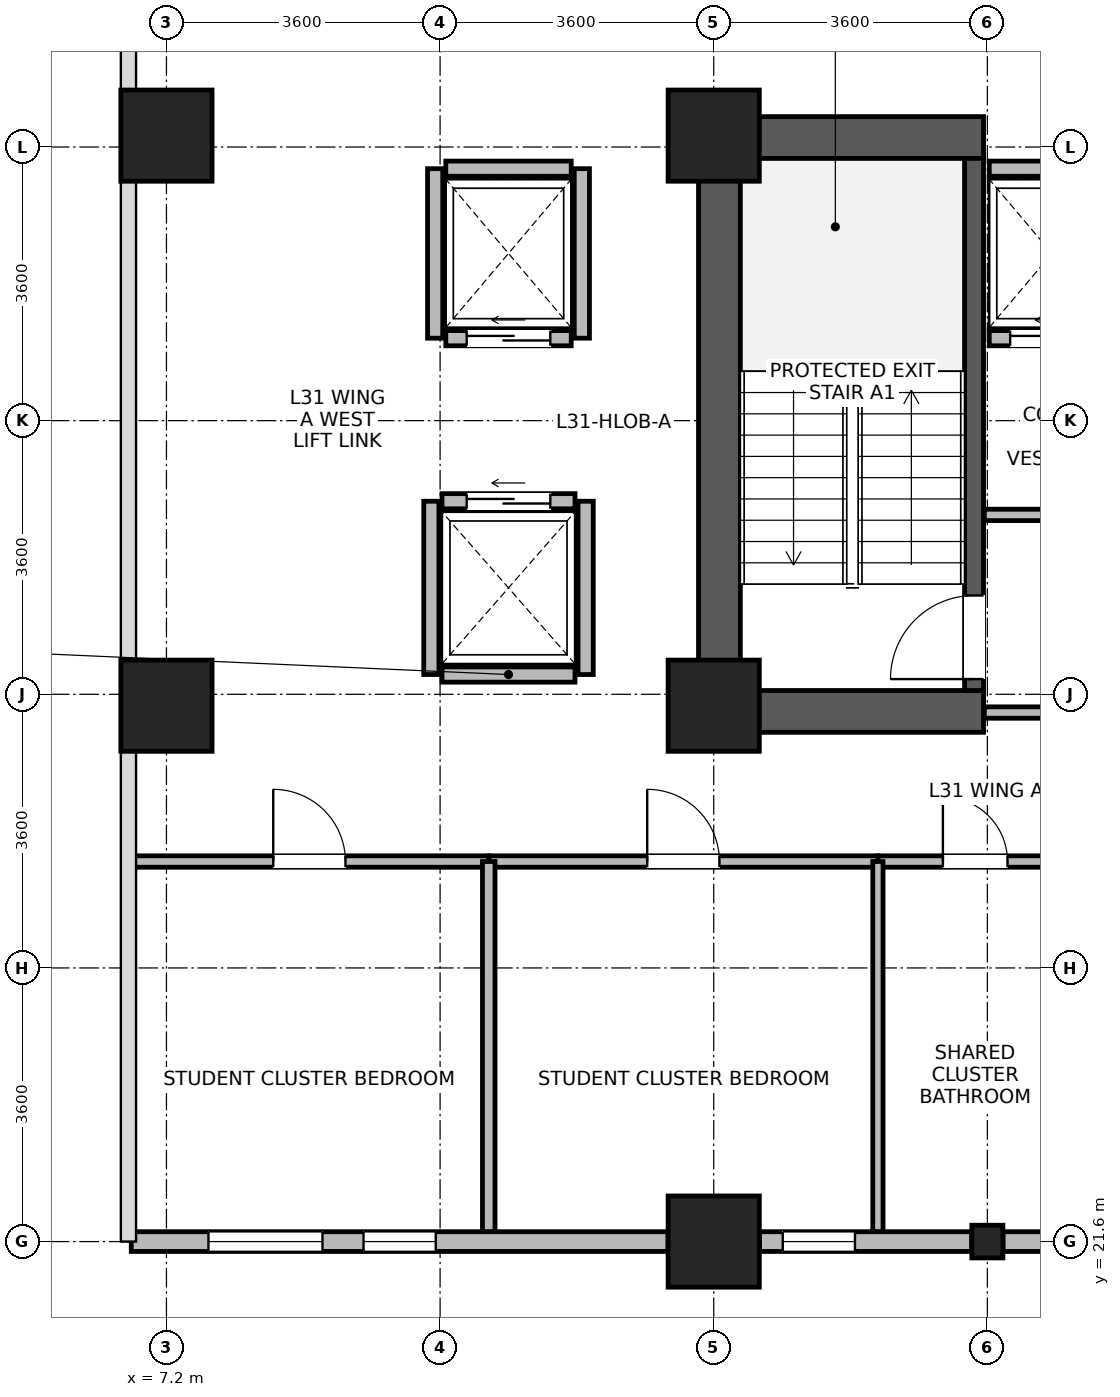
"""IFC4 building model, lengths in metres.
Left out: names, types, materials, properties, quantities, classifications, styles, units other than length and angle.
Written with IfcOpenShell. Run it as: python <this file> out.ifc"""

import sys

from ifc_helpers import new_model, si_unit, direction, frame, frame_2d, origin, origin_2d, place, context, subcontext, project, spatial, rectangle, i_section, extrude, source, transform, mapped, element, fill, save


model = new_model("IFC4")
c1 = context("Model", 3, precision=1e-05, world=origin(), true_north=direction((0.0, 1.0)))
c2 = subcontext(c1, "Body", "Model", "MODEL_VIEW")
j1 = project(units=[si_unit("LENGTHUNIT", "METRE"), si_unit("PLANEANGLEUNIT", "RADIAN")], contexts=[c1])
p1 = place(None, origin())
s1 = spatial("IfcSite", under=j1, at=p1, CompositionType="ELEMENT")
p2 = place(p1, origin())
s2 = spatial("IfcBuilding", under=s1, at=p2, CompositionType="ELEMENT")
p3 = place(p2, frame((0.0, 0.0, 123.0)))
s3 = spatial("IfcBuildingStorey", under=s2, at=p3, CompositionType="ELEMENT", Elevation=123.0)
p4 = place(p3, frame((14.475, 28.3, 0.0), z_axis=(0.0, 0.0, 1.0), x_axis=(0.0, 1.0, 0.0)))
e1 = element("IfcWall", 1, at=p4, inside=s3, PredefinedType="SHEAR", context=c2, shape_type="SweptSolid", body=[
    extrude(rectangle(XDim=8.1, YDim=0.55, at=frame_2d((4.05, 0.0))), origin(), (0.0, 0.0, 1.0), 3.45),
])
for number, where, z_axis, x_axis in (
    (2, (14.75, 28.575, 0.0), (0.0, 0.0, 1.0), (1.0, 0.0, 0.0)),
    (3, (14.75, 36.125, 0.0), (0.0, 0.0, 1.0), (1.0, 0.0, 0.0)),
):
    element("IfcWall", number, at=place(p3, frame(where, z_axis=z_axis, x_axis=x_axis)), inside=s3, PredefinedType="SHEAR", context=c2, shape_type="SweptSolid", body=[
        extrude(rectangle(XDim=3.2, YDim=0.55, at=frame_2d((1.6, 0.0))), origin(), (0.0, 0.0, 1.0), 3.45),
    ])
p5 = place(p3, frame((17.825, 28.85, 0.0), z_axis=(0.0, 0.0, 1.0), x_axis=(0.0, 1.0, 0.0)))
e4 = element("IfcWall", 4, at=p5, inside=s3, PredefinedType="SHEAR", context=c2, shape_type="SweptSolid", body=[
    extrude(rectangle(XDim=7.0, YDim=0.25, at=frame_2d((3.5, 0.0))), origin(), (0.0, 0.0, 1.0), 3.45),
])
p6 = place(p5, frame((0.15, 0.0, 0.0)))
e5 = element("IfcOpeningElement", 5, at=p6, cuts=e4, PredefinedType="OPENING", context=c2, shape_type="SweptSolid", body=[
    extrude(rectangle(XDim=1.1, YDim=2.08, at=frame_2d((0.55, 1.04))), frame((0.0, 0.135, 0.0), z_axis=(0.0, -1.0, 0.0), x_axis=(1.0, 0.0, 0.0)), (0.0, 0.0, 1.0), 0.27),
])
m1 = source(origin(), c2, "Body", "SweptSolid", [
    extrude(rectangle(XDim=1.2, YDim=1.2, at=origin_2d()), origin(), (0.0, 0.0, 1.0), 3.7),
])
for number, where, z_axis, x_axis in (
    (6, (7.2, 28.65, 0.0), (0.0, 0.0, 1.0), (1.0, 0.0, 0.0)),
    (7, (7.2, 36.15, 0.0), (0.0, 0.0, 1.0), (1.0, 0.0, 0.0)),
    (8, (14.4, 21.6, 0.0), (0.0, 0.0, 1.0), (1.0, 0.0, 0.0)),
    (9, (14.4, 28.65, 0.0), (0.0, 0.0, 1.0), (1.0, 0.0, 0.0)),
    (10, (14.4, 36.15, 0.0), (0.0, 0.0, 1.0), (1.0, 0.0, 0.0)),
):
    element("IfcColumn", number, at=place(p3, frame(where, z_axis=z_axis, x_axis=x_axis)), inside=s3, PredefinedType="COLUMN", context=c2, shape_type="MappedRepresentation", body=[
        mapped(m1, transform((0.0, 0.0, 0.0), x_axis=(1.0, 0.0, 0.0), y_axis=(0.0, 1.0, 0.0), z_axis=(0.0, 0.0, 1.0), scale=1.0)),
    ])
m2 = source(origin(), c2, "Body", "SweptSolid", [
    extrude(i_section(OverallWidth=0.409, OverallDepth=0.43, WebThickness=0.024, FlangeThickness=0.033, FilletRadius=0.015, at=origin_2d()), origin(), (0.0, 0.0, 1.0), 3.7),
])
p7 = place(p3, frame((18.0, 21.6, 0.0), z_axis=(0.0, 0.0, 1.0), x_axis=(1.0, 0.0, 0.0)))
e11 = element("IfcColumn", 11, at=p7, inside=s3, PredefinedType="COLUMN", context=c2, shape_type="MappedRepresentation", body=[
    mapped(m2, transform((0.0, 0.0, 0.0), x_axis=(1.0, 0.0, 0.0), y_axis=(0.0, 1.0, 0.0), z_axis=(0.0, 0.0, 1.0), scale=1.0)),
])
p8 = place(p3, frame((13.799, 21.6, 0.0), z_axis=(0.0, 0.0, 1.0), x_axis=(-1.0, 0.0, 0.0)))
e12 = element("IfcWall", 12, at=p8, inside=s3, PredefinedType="STANDARD", context=c2, shape_type="SweptSolid", body=[
    extrude(rectangle(XDim=7.062, YDim=0.26, at=frame_2d((3.531, 0.0))), origin(), (0.0, 0.0, 1.0), 3.43),
])
p9 = place(p8, frame((4.546, 0.0, 0.85)))
e13 = element("IfcOpeningElement", 13, at=p9, cuts=e12, PredefinedType="OPENING", context=c2, shape_type="SweptSolid", body=[
    extrude(rectangle(XDim=1.5, YDim=1.85, at=frame_2d((0.75, 0.925))), frame((0.0, 0.14, 0.0), z_axis=(0.0, -1.0, 0.0), x_axis=(1.0, 0.0, 0.0)), (0.0, 0.0, 1.0), 0.28),
])
p10 = place(p8, frame((3.056, 0.0, 0.85)))
e14 = element("IfcOpeningElement", 14, at=p10, cuts=e12, PredefinedType="OPENING", context=c2, shape_type="SweptSolid", body=[
    extrude(rectangle(XDim=0.95, YDim=1.75, at=frame_2d((0.475, 0.875))), frame((0.0, 0.14, 0.0), z_axis=(0.0, -1.0, 0.0), x_axis=(1.0, 0.0, 0.0)), (0.0, 0.0, 1.0), 0.28),
])
p11 = place(p3, frame((17.794, 21.6, 0.0), z_axis=(0.0, 0.0, 1.0), x_axis=(-1.0, 0.0, 0.0)))
e15 = element("IfcWall", 15, at=p11, inside=s3, PredefinedType="STANDARD", context=c2, shape_type="SweptSolid", body=[
    extrude(rectangle(XDim=2.793, YDim=0.26, at=frame_2d((1.397, 0.0))), origin(), (0.0, 0.0, 1.0), 2.98),
])
p12 = place(p11, frame((1.536, 0.0, 0.85)))
e16 = element("IfcOpeningElement", 16, at=p12, cuts=e15, PredefinedType="OPENING", context=c2, shape_type="SweptSolid", body=[
    extrude(rectangle(XDim=0.95, YDim=1.75, at=frame_2d((0.475, 0.875))), frame((0.0, 0.14, 0.0), z_axis=(0.0, -1.0, 0.0), x_axis=(1.0, 0.0, 0.0)), (0.0, 0.0, 1.0), 0.28),
])
p13 = place(p3, frame((20.999, 21.6, 0.0), z_axis=(0.0, 0.0, 1.0), x_axis=(-1.0, 0.0, 0.0)))
e17 = element("IfcWall", 17, at=p13, inside=s3, PredefinedType="STANDARD", context=c2, shape_type="SweptSolid", body=[
    extrude(rectangle(XDim=2.793, YDim=0.26, at=frame_2d((1.397, 0.0))), origin(), (0.0, 0.0, 1.0), 2.98),
])
p14 = place(p13, frame((0.307, 0.0, 0.85)))
e18 = element("IfcOpeningElement", 18, at=p14, cuts=e17, PredefinedType="OPENING", context=c2, shape_type="SweptSolid", body=[
    extrude(rectangle(XDim=0.95, YDim=1.75, at=frame_2d((0.475, 0.875))), frame((0.0, 0.14, 0.0), z_axis=(0.0, -1.0, 0.0), x_axis=(1.0, 0.0, 0.0)), (0.0, 0.0, 1.0), 0.28),
])
p15 = place(p3, frame((18.025, 33.485, 0.0), z_axis=(0.0, 0.0, 1.0), x_axis=(1.0, 0.0, 0.0)))
e19 = element("IfcWall", 19, at=p15, inside=s3, PredefinedType="PARTITIONING", context=c2, shape_type="SweptSolid", body=[
    extrude(rectangle(XDim=1.65, YDim=0.2, at=frame_2d((0.825, 0.0))), origin(), (0.0, 0.0, 1.0), 3.43),
])
p16 = place(p15, frame((0.275, 0.0, 0.0)))
e20 = element("IfcOpeningElement", 20, at=p16, cuts=e19, PredefinedType="OPENING", context=c2, shape_type="SweptSolid", body=[
    extrude(rectangle(XDim=1.1, YDim=2.12, at=frame_2d((0.55, 1.06))), frame((0.0, 0.11, 0.0), z_axis=(0.0, -1.0, 0.0), x_axis=(1.0, 0.0, 0.0)), (0.0, 0.0, 1.0), 0.22),
])
p17 = place(p3, frame((18.025, 35.715, 0.0), z_axis=(0.0, 0.0, 1.0), x_axis=(1.0, 0.0, 0.0)))
e21 = element("IfcWall", 21, at=p17, inside=s3, PredefinedType="PARTITIONING", context=c2, shape_type="SweptSolid", body=[
    extrude(rectangle(XDim=1.65, YDim=0.2, at=frame_2d((0.825, 0.0))), origin(), (0.0, 0.0, 1.0), 3.43),
])
p18 = place(p3, frame((10.825, 29.06, 0.0), z_axis=(0.0, 0.0, 1.0), x_axis=(1.0, 0.0, 0.0)))
e22 = element("IfcWall", 22, at=p18, inside=s3, PredefinedType="PARTITIONING", context=c2, shape_type="SweptSolid", body=[
    extrude(rectangle(XDim=1.75, YDim=0.2, at=frame_2d((0.875, 0.0))), origin(), (0.0, 0.0, 1.0), 3.43),
])
p19 = place(p3, frame((10.825, 31.34, 0.0), z_axis=(0.0, 0.0, 1.0), x_axis=(1.0, 0.0, 0.0)))
e23 = element("IfcWall", 23, at=p19, inside=s3, PredefinedType="PARTITIONING", context=c2, shape_type="SweptSolid", body=[
    extrude(rectangle(XDim=1.75, YDim=0.2, at=frame_2d((0.875, 0.0))), origin(), (0.0, 0.0, 1.0), 3.43),
])
p20 = place(p19, frame((0.325, 0.0, 0.0)))
e24 = element("IfcOpeningElement", 24, at=p20, cuts=e23, PredefinedType="OPENING", context=c2, shape_type="SweptSolid", body=[
    extrude(rectangle(XDim=1.1, YDim=2.12, at=frame_2d((0.55, 1.06))), frame((0.0, 0.11, 0.0), z_axis=(0.0, -1.0, 0.0), x_axis=(1.0, 0.0, 0.0)), (0.0, 0.0, 1.0), 0.22),
])
for number, where, z_axis, x_axis in (
    (25, (10.685, 29.06, 0.0), (0.0, 0.0, 1.0), (0.0, 1.0, 0.0)),
    (26, (12.715, 29.06, 0.0), (0.0, 0.0, 1.0), (0.0, 1.0, 0.0)),
):
    element("IfcWall", number, at=place(p3, frame(where, z_axis=z_axis, x_axis=x_axis)), inside=s3, PredefinedType="PARTITIONING", context=c2, shape_type="SweptSolid", body=[
        extrude(rectangle(XDim=2.28, YDim=0.2, at=frame_2d((1.14, 0.0))), origin(), (0.0, 0.0, 1.0), 3.43),
    ])
p21 = place(p3, frame((10.875, 33.485, 0.0), z_axis=(0.0, 0.0, 1.0), x_axis=(1.0, 0.0, 0.0)))
e27 = element("IfcWall", 27, at=p21, inside=s3, PredefinedType="PARTITIONING", context=c2, shape_type="SweptSolid", body=[
    extrude(rectangle(XDim=1.65, YDim=0.2, at=frame_2d((0.825, 0.0))), origin(), (0.0, 0.0, 1.0), 3.43),
])
p22 = place(p21, frame((0.275, 0.0, 0.0)))
e28 = element("IfcOpeningElement", 28, at=p22, cuts=e27, PredefinedType="OPENING", context=c2, shape_type="SweptSolid", body=[
    extrude(rectangle(XDim=1.1, YDim=2.12, at=frame_2d((0.55, 1.06))), frame((0.0, 0.11, 0.0), z_axis=(0.0, -1.0, 0.0), x_axis=(1.0, 0.0, 0.0)), (0.0, 0.0, 1.0), 0.22),
])
p23 = place(p3, frame((10.875, 35.715, 0.0), z_axis=(0.0, 0.0, 1.0), x_axis=(1.0, 0.0, 0.0)))
e29 = element("IfcWall", 29, at=p23, inside=s3, PredefinedType="PARTITIONING", context=c2, shape_type="SweptSolid", body=[
    extrude(rectangle(XDim=1.65, YDim=0.2, at=frame_2d((0.825, 0.0))), origin(), (0.0, 0.0, 1.0), 3.43),
])
for number, where, z_axis, x_axis in (
    (30, (10.735, 33.485, 0.0), (0.0, 0.0, 1.0), (0.0, 1.0, 0.0)),
    (31, (12.665, 33.485, 0.0), (0.0, 0.0, 1.0), (0.0, 1.0, 0.0)),
):
    element("IfcWall", number, at=place(p3, frame(where, z_axis=z_axis, x_axis=x_axis)), inside=s3, PredefinedType="PARTITIONING", context=c2, shape_type="SweptSolid", body=[
        extrude(rectangle(XDim=2.23, YDim=0.2, at=frame_2d((1.115, 0.0))), origin(), (0.0, 0.0, 1.0), 3.43),
    ])
p24 = place(p3, frame((11.44, 26.6, 0.0), z_axis=(0.0, 0.0, 1.0), x_axis=(1.0, 0.0, 0.0)))
e32 = element("IfcWall", 32, at=p24, inside=s3, PredefinedType="PARTITIONING", context=c2, shape_type="SweptSolid", body=[
    extrude(rectangle(XDim=5.12, YDim=0.15, at=frame_2d((2.56, 0.0))), origin(), (0.0, 0.0, 1.0), 3.43),
])
p25 = place(p24, frame((2.085, 0.0, 0.0)))
e33 = element("IfcOpeningElement", 33, at=p25, cuts=e32, PredefinedType="OPENING", context=c2, shape_type="SweptSolid", body=[
    extrude(rectangle(XDim=0.95, YDim=2.1, at=frame_2d((0.475, 1.05))), frame((0.0, 0.085, 0.0), z_axis=(0.0, -1.0, 0.0), x_axis=(1.0, 0.0, 0.0)), (0.0, 0.0, 1.0), 0.17),
])
p26 = place(p3, frame((6.72, 26.6, 0.0), z_axis=(0.0, 0.0, 1.0), x_axis=(1.0, 0.0, 0.0)))
e34 = element("IfcWall", 34, at=p26, inside=s3, PredefinedType="PARTITIONING", context=c2, shape_type="SweptSolid", body=[
    extrude(rectangle(XDim=4.72, YDim=0.15, at=frame_2d((2.36, 0.0))), origin(), (0.0, 0.0, 1.0), 3.43),
])
p27 = place(p26, frame((1.885, 0.0, 0.0)))
e35 = element("IfcOpeningElement", 35, at=p27, cuts=e34, PredefinedType="OPENING", context=c2, shape_type="SweptSolid", body=[
    extrude(rectangle(XDim=0.95, YDim=2.1, at=frame_2d((0.475, 1.05))), frame((0.0, 0.085, 0.0), z_axis=(0.0, -1.0, 0.0), x_axis=(1.0, 0.0, 0.0)), (0.0, 0.0, 1.0), 0.17),
])
p28 = place(p3, frame((16.56, 26.6, 0.0), z_axis=(0.0, 0.0, 1.0), x_axis=(1.0, 0.0, 0.0)))
e36 = element("IfcWall", 36, at=p28, inside=s3, PredefinedType="PARTITIONING", context=c2, shape_type="SweptSolid", body=[
    extrude(rectangle(XDim=2.56, YDim=0.15, at=frame_2d((1.28, 0.0))), origin(), (0.0, 0.0, 1.0), 3.43),
])
p29 = place(p28, frame((0.855, 0.0, 0.0)))
e37 = element("IfcOpeningElement", 37, at=p29, cuts=e36, PredefinedType="OPENING", context=c2, shape_type="SweptSolid", body=[
    extrude(rectangle(XDim=0.85, YDim=2.04, at=frame_2d((0.425, 1.02))), frame((0.0, 0.085, 0.0), z_axis=(0.0, -1.0, 0.0), x_axis=(1.0, 0.0, 0.0)), (0.0, 0.0, 1.0), 0.17),
])
p30 = place(p3, frame((17.96, 28.56, 0.0), z_axis=(0.0, 0.0, 1.0), x_axis=(1.0, 0.0, 0.0)))
e38 = element("IfcWall", 38, at=p30, inside=s3, PredefinedType="PARTITIONING", context=c2, shape_type="SweptSolid", body=[
    extrude(rectangle(XDim=2.0, YDim=0.15, at=frame_2d((1.0, 0.0))), origin(), (0.0, 0.0, 1.0), 2.43),
])
p31 = place(p3, frame((17.96, 31.16, 0.0), z_axis=(0.0, 0.0, 1.0), x_axis=(1.0, 0.0, 0.0)))
e39 = element("IfcWall", 39, at=p31, inside=s3, PredefinedType="PARTITIONING", context=c2, shape_type="SweptSolid", body=[
    extrude(rectangle(XDim=2.0, YDim=0.15, at=frame_2d((1.0, 0.0))), origin(), (0.0, 0.0, 1.0), 3.43),
])
p32 = place(p3, frame((11.44, 21.732, 0.0), z_axis=(0.0, 0.0, 1.0), x_axis=(0.0, 1.0, 0.0)))
e40 = element("IfcWall", 40, at=p32, inside=s3, PredefinedType="PARTITIONING", context=c2, shape_type="SweptSolid", body=[
    extrude(rectangle(XDim=4.868, YDim=0.165, at=frame_2d((2.434, 0.0))), origin(), (0.0, 0.0, 1.0), 3.43),
])
p33 = place(p3, frame((16.56, 21.732, 0.0), z_axis=(0.0, 0.0, 1.0), x_axis=(0.0, 1.0, 0.0)))
e41 = element("IfcWall", 41, at=p33, inside=s3, PredefinedType="PARTITIONING", context=c2, shape_type="SweptSolid", body=[
    extrude(rectangle(XDim=4.868, YDim=0.135, at=frame_2d((2.434, 0.0))), origin(), (0.0, 0.0, 1.0), 3.43),
])
p34 = place(p9, origin())
e42 = element("IfcWindow", 42, at=p34, inside=s3, PartitioningType="SINGLE_PANEL", PredefinedType="WINDOW", context=c2, shape_type="SweptSolid", body=[
    extrude(rectangle(XDim=1.5, YDim=1.85, at=frame_2d((0.75, 0.925))), frame((0.0, 0.03, 0.0), z_axis=(0.0, -1.0, 0.0), x_axis=(1.0, 0.0, 0.0)), (0.0, 0.0, 1.0), 0.06),
])
fill(e13, e42)
p35 = place(p10, origin())
e43 = element("IfcWindow", 43, at=p35, inside=s3, PartitioningType="SINGLE_PANEL", PredefinedType="WINDOW", context=c2, shape_type="SweptSolid", body=[
    extrude(rectangle(XDim=0.95, YDim=1.75, at=frame_2d((0.475, 0.875))), frame((0.0, 0.03, 0.0), z_axis=(0.0, -1.0, 0.0), x_axis=(1.0, 0.0, 0.0)), (0.0, 0.0, 1.0), 0.06),
])
fill(e14, e43)
p36 = place(p12, origin())
e44 = element("IfcWindow", 44, at=p36, inside=s3, PartitioningType="SINGLE_PANEL", PredefinedType="WINDOW", context=c2, shape_type="SweptSolid", body=[
    extrude(rectangle(XDim=0.95, YDim=1.75, at=frame_2d((0.475, 0.875))), frame((0.0, 0.03, 0.0), z_axis=(0.0, -1.0, 0.0), x_axis=(1.0, 0.0, 0.0)), (0.0, 0.0, 1.0), 0.06),
])
fill(e16, e44)
p37 = place(p6, origin())
e45 = element("IfcDoor", 45, at=p37, inside=s3, OperationType="SINGLE_SWING_LEFT", PredefinedType="DOOR", context=c2, shape_type="SweptSolid", body=[
    extrude(rectangle(XDim=1.1, YDim=2.08, at=frame_2d((0.55, 1.04))), frame((0.0, 0.025, 0.0), z_axis=(0.0, -1.0, 0.0), x_axis=(1.0, 0.0, 0.0)), (0.0, 0.0, 1.0), 0.05),
])
fill(e5, e45)
p38 = place(p16, origin())
e46 = element("IfcDoor", 46, at=p38, inside=s3, OperationType="SLIDING_TO_LEFT", PredefinedType="DOOR", context=c2, shape_type="SweptSolid", body=[
    extrude(rectangle(XDim=1.1, YDim=2.12, at=frame_2d((0.55, 1.06))), frame((0.0, 0.025, 0.0), z_axis=(0.0, -1.0, 0.0), x_axis=(1.0, 0.0, 0.0)), (0.0, 0.0, 1.0), 0.05),
])
fill(e20, e46)
p39 = place(p20, origin())
e47 = element("IfcDoor", 47, at=p39, inside=s3, OperationType="SLIDING_TO_LEFT", PredefinedType="DOOR", context=c2, shape_type="SweptSolid", body=[
    extrude(rectangle(XDim=1.1, YDim=2.12, at=frame_2d((0.55, 1.06))), frame((0.0, 0.025, 0.0), z_axis=(0.0, -1.0, 0.0), x_axis=(1.0, 0.0, 0.0)), (0.0, 0.0, 1.0), 0.05),
])
fill(e24, e47)
p40 = place(p22, origin())
e48 = element("IfcDoor", 48, at=p40, inside=s3, OperationType="SLIDING_TO_LEFT", PredefinedType="DOOR", context=c2, shape_type="SweptSolid", body=[
    extrude(rectangle(XDim=1.1, YDim=2.12, at=frame_2d((0.55, 1.06))), frame((0.0, 0.025, 0.0), z_axis=(0.0, -1.0, 0.0), x_axis=(1.0, 0.0, 0.0)), (0.0, 0.0, 1.0), 0.05),
])
fill(e28, e48)
p41 = place(p25, origin())
e49 = element("IfcDoor", 49, at=p41, inside=s3, OperationType="SINGLE_SWING_LEFT", PredefinedType="DOOR", context=c2, shape_type="SweptSolid", body=[
    extrude(rectangle(XDim=0.95, YDim=2.1, at=frame_2d((0.475, 1.05))), frame((0.0, 0.025, 0.0), z_axis=(0.0, -1.0, 0.0), x_axis=(1.0, 0.0, 0.0)), (0.0, 0.0, 1.0), 0.05),
])
fill(e33, e49)
p42 = place(p27, origin())
e50 = element("IfcDoor", 50, at=p42, inside=s3, OperationType="SINGLE_SWING_LEFT", PredefinedType="DOOR", context=c2, shape_type="SweptSolid", body=[
    extrude(rectangle(XDim=0.95, YDim=2.1, at=frame_2d((0.475, 1.05))), frame((0.0, 0.025, 0.0), z_axis=(0.0, -1.0, 0.0), x_axis=(1.0, 0.0, 0.0)), (0.0, 0.0, 1.0), 0.05),
])
fill(e35, e50)
p43 = place(p29, origin())
e51 = element("IfcDoor", 51, at=p43, inside=s3, OperationType="SINGLE_SWING_LEFT", PredefinedType="DOOR", context=c2, shape_type="SweptSolid", body=[
    extrude(rectangle(XDim=0.85, YDim=2.04, at=frame_2d((0.425, 1.02))), frame((0.0, 0.025, 0.0), z_axis=(0.0, -1.0, 0.0), x_axis=(1.0, 0.0, 0.0)), (0.0, 0.0, 1.0), 0.05),
])
fill(e37, e51)
save(model, sys.argv[1])
